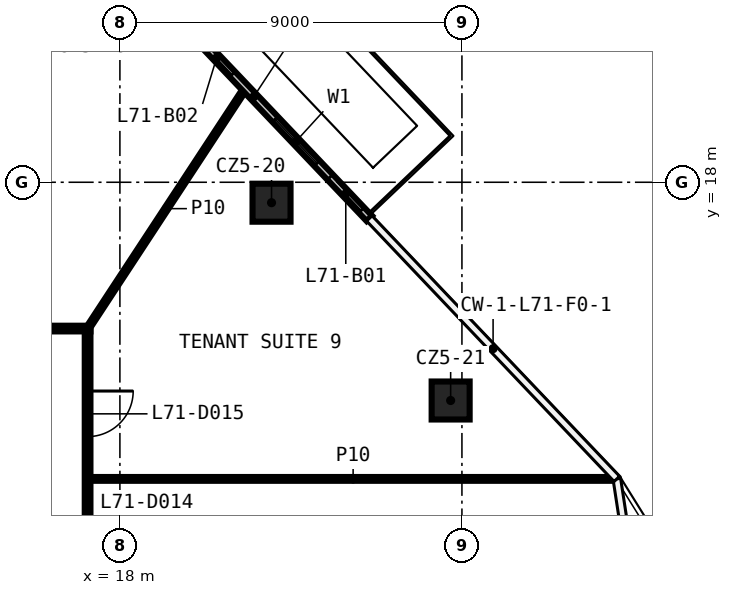
"""IFC4 building model, lengths in metres.
Left out: names, types, materials, properties, quantities, classifications, styles, units other than length and angle.
Written with IfcOpenShell. Run it as: python <this file> out.ifc"""

import sys

from ifc_helpers import new_model, si_unit, direction, frame, frame_2d, origin, origin_2d, place, context, subcontext, project, spatial, rectangle, extrude, element, fill, save


model = new_model("IFC4")
c1 = context("Model", 3, precision=1e-05, world=origin(), true_north=direction((0.0, 1.0)))
c2 = subcontext(c1, "Body", "Model", "MODEL_VIEW")
j1 = project(units=[si_unit("LENGTHUNIT", "METRE"), si_unit("PLANEANGLEUNIT", "RADIAN")], contexts=[c1])
p1 = place(None, origin())
s1 = spatial("IfcSite", under=j1, at=p1, CompositionType="ELEMENT")
p2 = place(p1, origin())
s2 = spatial("IfcBuilding", under=s1, at=p2, CompositionType="ELEMENT")
p3 = place(p2, frame((0.0, 0.0, 332.0)))
s3 = spatial("IfcBuildingStorey", under=s2, at=p3, CompositionType="ELEMENT", Elevation=332.0)
for number, where, z_axis, x_axis in (
    (1, (21.99, 17.462, 0.0), (0.0, 0.0, 1.0), (1.0, 0.0, 0.0)),
    (2, (26.703, 12.257, 0.0), (0.0, 0.0, 1.0), (1.0, 0.0, 0.0)),
):
    element("IfcColumn", number, at=place(p3, frame(where, z_axis=z_axis, x_axis=x_axis)), inside=s3, PredefinedType="COLUMN", context=c2, shape_type="SweptSolid", body=[
        extrude(rectangle(XDim=1.0, YDim=1.0, at=origin_2d()), origin(), (0.0, 0.0, 1.0), 3.82),
    ])
p4 = place(p3, frame((17.225, 10.194, 0.0), z_axis=(0.0, 0.0, 1.0), x_axis=(1.0, 0.0, 0.0)))
e3 = element("IfcWall", 3, at=p4, inside=s3, PredefinedType="PARTITIONING", context=c2, shape_type="SweptSolid", body=[
    extrude(rectangle(XDim=13.823, YDim=0.1, at=frame_2d((6.912, 0.0))), origin(), (0.0, 0.0, 1.0), 3.82),
])
p5 = place(p3, frame((-17.225, 14.15, 0.0), z_axis=(0.0, 0.0, 1.0), x_axis=(1.0, 0.0, 0.0)))
e4 = element("IfcWall", 4, at=p5, inside=s3, PredefinedType="PARTITIONING", context=c2, shape_type="SweptSolid", body=[
    extrude(rectangle(XDim=34.45, YDim=0.15, at=frame_2d((17.225, 0.0))), origin(), (0.0, 0.0, 1.0), 3.82),
])
p6 = place(p5, frame((24.708, 0.0, 0.0)))
e5 = element("IfcOpeningElement", 5, at=p6, cuts=e4, PredefinedType="OPENING", context=c2, shape_type="SweptSolid", body=[
    extrude(rectangle(XDim=1.2, YDim=2.1, at=frame_2d((0.6, 1.05))), frame((0.0, 0.085, 0.0), z_axis=(0.0, -1.0, 0.0), x_axis=(1.0, 0.0, 0.0)), (0.0, 0.0, 1.0), 0.17),
])
p7 = place(p5, frame((20.038, 0.0, 0.0)))
e6 = element("IfcOpeningElement", 6, at=p7, cuts=e4, PredefinedType="OPENING", context=c2, shape_type="SweptSolid", body=[
    extrude(rectangle(XDim=1.2, YDim=2.1, at=frame_2d((0.6, 1.05))), frame((0.0, 0.085, 0.0), z_axis=(0.0, -1.0, 0.0), x_axis=(1.0, 0.0, 0.0)), (0.0, 0.0, 1.0), 0.17),
])
p8 = place(p5, frame((15.367, 0.0, 0.0)))
e7 = element("IfcOpeningElement", 7, at=p8, cuts=e4, PredefinedType="OPENING", context=c2, shape_type="SweptSolid", body=[
    extrude(rectangle(XDim=1.2, YDim=2.1, at=frame_2d((0.6, 1.05))), frame((0.0, 0.085, 0.0), z_axis=(0.0, -1.0, 0.0), x_axis=(1.0, 0.0, 0.0)), (0.0, 0.0, 1.0), 0.17),
])
p9 = place(p5, frame((10.695, 0.0, 0.0)))
e8 = element("IfcOpeningElement", 8, at=p9, cuts=e4, PredefinedType="OPENING", context=c2, shape_type="SweptSolid", body=[
    extrude(rectangle(XDim=1.2, YDim=2.1, at=frame_2d((0.6, 1.05))), frame((0.0, 0.085, 0.0), z_axis=(0.0, -1.0, 0.0), x_axis=(1.0, 0.0, 0.0)), (0.0, 0.0, 1.0), 0.17),
])
p10 = place(p5, frame((6.025, 0.0, 0.0)))
e9 = element("IfcOpeningElement", 9, at=p10, cuts=e4, PredefinedType="OPENING", context=c2, shape_type="SweptSolid", body=[
    extrude(rectangle(XDim=1.2, YDim=2.1, at=frame_2d((0.6, 1.05))), frame((0.0, 0.085, 0.0), z_axis=(0.0, -1.0, 0.0), x_axis=(1.0, 0.0, 0.0)), (0.0, 0.0, 1.0), 0.17),
])
p11 = place(p5, frame((1.698, 0.0, 0.0)))
e10 = element("IfcOpeningElement", 10, at=p11, cuts=e4, PredefinedType="OPENING", context=c2, shape_type="SweptSolid", body=[
    extrude(rectangle(XDim=1.2, YDim=2.1, at=frame_2d((0.6, 1.05))), frame((0.0, 0.085, 0.0), z_axis=(0.0, -1.0, 0.0), x_axis=(1.0, 0.0, 0.0)), (0.0, 0.0, 1.0), 0.17),
])
p12 = place(p3, frame((17.15, 14.15, 0.0), z_axis=(0.0, 0.0, 1.0), x_axis=(0.548731307267, 0.835998775373, 0.0)))
e11 = element("IfcWall", 11, at=p12, inside=s3, PredefinedType="PARTITIONING", context=c2, shape_type="SweptSolid", body=[
    extrude(rectangle(XDim=7.55, YDim=0.1, at=frame_2d((3.775, 0.0))), origin(), (0.0, 0.0, 1.0), 3.82),
])
p13 = place(p3, frame((17.15, 14.075, 0.0), z_axis=(0.0, 0.0, 1.0), x_axis=(0.0, -1.0, 0.0)))
e12 = element("IfcWall", 12, at=p13, inside=s3, PredefinedType="PARTITIONING", context=c2, shape_type="SweptSolid", body=[
    extrude(rectangle(XDim=28.15, YDim=0.15, at=frame_2d((14.075, 0.0))), origin(), (0.0, 0.0, 1.0), 3.82),
])
p14 = place(p13, frame((24.339, 0.0, 0.0)))
e13 = element("IfcOpeningElement", 13, at=p14, cuts=e12, PredefinedType="OPENING", context=c2, shape_type="SweptSolid", body=[
    extrude(rectangle(XDim=1.2, YDim=2.1, at=frame_2d((0.6, 1.05))), frame((0.0, 0.085, 0.0), z_axis=(0.0, -1.0, 0.0), x_axis=(1.0, 0.0, 0.0)), (0.0, 0.0, 1.0), 0.17),
])
p15 = place(p13, frame((20.227, 0.0, 0.0)))
e14 = element("IfcOpeningElement", 14, at=p15, cuts=e12, PredefinedType="OPENING", context=c2, shape_type="SweptSolid", body=[
    extrude(rectangle(XDim=1.2, YDim=2.1, at=frame_2d((0.6, 1.05))), frame((0.0, 0.085, 0.0), z_axis=(0.0, -1.0, 0.0), x_axis=(1.0, 0.0, 0.0)), (0.0, 0.0, 1.0), 0.17),
])
p16 = place(p13, frame((16.115, 0.0, 0.0)))
e15 = element("IfcOpeningElement", 15, at=p16, cuts=e12, PredefinedType="OPENING", context=c2, shape_type="SweptSolid", body=[
    extrude(rectangle(XDim=1.2, YDim=2.1, at=frame_2d((0.6, 1.05))), frame((0.0, 0.085, 0.0), z_axis=(0.0, -1.0, 0.0), x_axis=(1.0, 0.0, 0.0)), (0.0, 0.0, 1.0), 0.17),
])
p17 = place(p13, frame((12.006, 0.0, 0.0)))
e16 = element("IfcOpeningElement", 16, at=p17, cuts=e12, PredefinedType="OPENING", context=c2, shape_type="SweptSolid", body=[
    extrude(rectangle(XDim=1.2, YDim=2.1, at=frame_2d((0.6, 1.05))), frame((0.0, 0.085, 0.0), z_axis=(0.0, -1.0, 0.0), x_axis=(1.0, 0.0, 0.0)), (0.0, 0.0, 1.0), 0.17),
])
p18 = place(p13, frame((5.464, 0.0, 0.0)))
e17 = element("IfcOpeningElement", 17, at=p18, cuts=e12, PredefinedType="OPENING", context=c2, shape_type="SweptSolid", body=[
    extrude(rectangle(XDim=1.2, YDim=2.1, at=frame_2d((0.6, 1.05))), frame((0.0, 0.085, 0.0), z_axis=(0.0, -1.0, 0.0), x_axis=(1.0, 0.0, 0.0)), (0.0, 0.0, 1.0), 0.17),
])
p19 = place(p13, frame((1.569, 0.0, 0.0)))
e18 = element("IfcOpeningElement", 18, at=p19, cuts=e12, PredefinedType="OPENING", context=c2, shape_type="SweptSolid", body=[
    extrude(rectangle(XDim=1.2, YDim=2.1, at=frame_2d((0.6, 1.05))), frame((0.0, 0.085, 0.0), z_axis=(0.0, -1.0, 0.0), x_axis=(1.0, 0.0, 0.0)), (0.0, 0.0, 1.0), 0.17),
])
p20 = place(p3, frame((24.563, 17.049, 0.0), z_axis=(0.0, 0.0, 1.0), x_axis=(-0.688807081371, 0.724944690755, 0.0)))
e19 = element("IfcWall", 19, at=p20, inside=s3, PredefinedType="SOLIDWALL", context=c2, shape_type="SweptSolid", body=[
    extrude(rectangle(XDim=9.465, YDim=0.2, at=frame_2d((4.732, 0.0))), origin(), (0.0, 0.0, 1.0), 3.82),
])
p21 = place(p20, frame((2.0, 0.0, 0.6)))
e20 = element("IfcOpeningElement", 20, at=p21, cuts=e19, PredefinedType="OPENING", context=c2, shape_type="SweptSolid", body=[
    extrude(rectangle(XDim=1.6, YDim=2.4, at=frame_2d((0.8, 1.2))), frame((0.0, 0.11, 0.0), z_axis=(0.0, -1.0, 0.0), x_axis=(1.0, 0.0, 0.0)), (0.0, 0.0, 1.0), 0.22),
])
p22 = place(p20, frame((0.3, 0.0, 0.0)))
e21 = element("IfcOpeningElement", 21, at=p22, cuts=e19, PredefinedType="OPENING", context=c2, shape_type="SweptSolid", body=[
    extrude(rectangle(XDim=1.2, YDim=2.4, at=frame_2d((0.6, 1.2))), frame((0.0, 0.11, 0.0), z_axis=(0.0, -1.0, 0.0), x_axis=(1.0, 0.0, 0.0)), (0.0, 0.0, 1.0), 0.22),
])
p23 = place(p20, frame((6.733, 0.0, 0.6)))
e22 = element("IfcOpeningElement", 22, at=p23, cuts=e19, PredefinedType="OPENING", context=c2, shape_type="SweptSolid", body=[
    extrude(rectangle(XDim=1.6, YDim=2.4, at=frame_2d((0.8, 1.2))), frame((0.0, 0.11, 0.0), z_axis=(0.0, -1.0, 0.0), x_axis=(1.0, 0.0, 0.0)), (0.0, 0.0, 1.0), 0.22),
])
p24 = place(p20, frame((5.233, 0.0, 0.0)))
e23 = element("IfcOpeningElement", 23, at=p24, cuts=e19, PredefinedType="OPENING", context=c2, shape_type="SweptSolid", body=[
    extrude(rectangle(XDim=1.2, YDim=2.4, at=frame_2d((0.6, 1.2))), frame((0.0, 0.11, 0.0), z_axis=(0.0, -1.0, 0.0), x_axis=(1.0, 0.0, 0.0)), (0.0, 0.0, 1.0), 0.22),
])
p25 = place(p19, origin())
e24 = element("IfcDoor", 24, at=p25, inside=s3, OperationType="SINGLE_SWING_RIGHT", PredefinedType="DOOR", context=c2, shape_type="SweptSolid", body=[
    extrude(rectangle(XDim=1.2, YDim=2.1, at=frame_2d((0.6, 1.05))), frame((0.0, 0.025, 0.0), z_axis=(0.0, -1.0, 0.0), x_axis=(1.0, 0.0, 0.0)), (0.0, 0.0, 1.0), 0.05),
])
fill(e18, e24)
p26 = place(p21, origin())
e25 = element("IfcWindow", 25, at=p26, inside=s3, PartitioningType="SINGLE_PANEL", PredefinedType="WINDOW", context=c2, shape_type="SweptSolid", body=[
    extrude(rectangle(XDim=1.6, YDim=2.4, at=frame_2d((0.8, 1.2))), frame((0.0, 0.03, 0.0), z_axis=(0.0, -1.0, 0.0), x_axis=(1.0, 0.0, 0.0)), (0.0, 0.0, 1.0), 0.06),
])
fill(e20, e25)
p27 = place(p22, origin())
e26 = element("IfcDoor", 26, at=p27, inside=s3, OperationType="SLIDING_TO_LEFT", PredefinedType="DOOR", context=c2, shape_type="SweptSolid", body=[
    extrude(rectangle(XDim=1.2, YDim=2.4, at=frame_2d((0.6, 1.2))), frame((0.0, 0.025, 0.0), z_axis=(0.0, -1.0, 0.0), x_axis=(1.0, 0.0, 0.0)), (0.0, 0.0, 1.0), 0.05),
])
fill(e21, e26)
p28 = place(p24, origin())
e27 = element("IfcDoor", 27, at=p28, inside=s3, OperationType="SLIDING_TO_LEFT", PredefinedType="DOOR", context=c2, shape_type="SweptSolid", body=[
    extrude(rectangle(XDim=1.2, YDim=2.4, at=frame_2d((0.6, 1.2))), frame((0.0, 0.025, 0.0), z_axis=(0.0, -1.0, 0.0), x_axis=(1.0, 0.0, 0.0)), (0.0, 0.0, 1.0), 0.05),
])
fill(e23, e27)
save(model, sys.argv[1])
